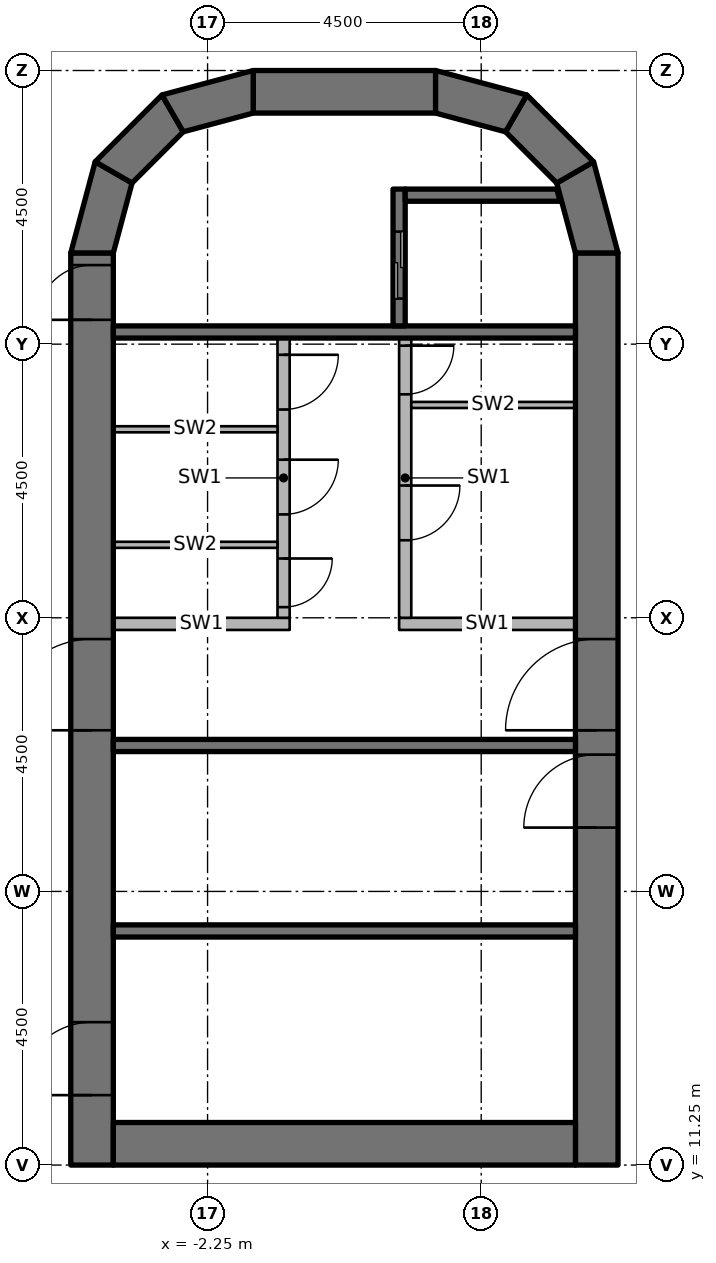
"""IFC4 building model, lengths in metres.
Left out: names, types, materials, properties, quantities, classifications, styles, units other than length and angle.
Written with IfcOpenShell. Run it as: python <this file> out.ifc"""

import sys

from ifc_helpers import new_model, si_unit, direction, frame, frame_2d, origin, place, context, subcontext, project, spatial, polyline, rectangle, outline, extrude, element, fill, save


model = new_model("IFC4")
c1 = context("Model", 3, precision=1e-05, world=origin(), true_north=direction((0.0, 1.0)))
c2 = subcontext(c1, "Body", "Model", "MODEL_VIEW")
j1 = project(units=[si_unit("LENGTHUNIT", "METRE"), si_unit("PLANEANGLEUNIT", "RADIAN")], contexts=[c1])
p1 = place(None, origin())
s1 = spatial("IfcSite", under=j1, at=p1, CompositionType="ELEMENT")
p2 = place(p1, origin())
s2 = spatial("IfcBuilding", under=s1, at=p2, CompositionType="ELEMENT")
p3 = place(p2, frame((0.0, 0.0, 190.4)))
s3 = spatial("IfcBuildingStorey", under=s2, at=p3, CompositionType="ELEMENT", Elevation=190.4)
p4 = place(p3, frame((-4.15, 11.25, 0.0), z_axis=(0.0, 0.0, 1.0), x_axis=(0.0, 1.0, 0.0)))
e1 = element("IfcWall", 1, at=p4, inside=s3, PredefinedType="SHEAR", context=c2, shape_type="SweptSolid", body=[
    extrude(rectangle(XDim=15.0, YDim=0.7, at=frame_2d((7.5, 0.0))), origin(), (0.0, 0.0, 1.0), 5.0),
])
p5 = place(p4, frame((7.15, 0.0, 0.0)))
e2 = element("IfcOpeningElement", 2, at=p5, cuts=e1, PredefinedType="OPENING", context=c2, shape_type="SweptSolid", body=[
    extrude(rectangle(XDim=1.5, YDim=2.3, at=frame_2d((0.75, 1.15))), frame((0.0, 0.36, 0.0), z_axis=(0.0, -1.0, 0.0), x_axis=(1.0, 0.0, 0.0)), (0.0, 0.0, 1.0), 0.72),
])
p6 = place(p4, frame((13.9, 0.0, 0.0)))
e3 = element("IfcOpeningElement", 3, at=p6, cuts=e1, PredefinedType="OPENING", context=c2, shape_type="SweptSolid", body=[
    extrude(rectangle(XDim=0.9, YDim=2.1, at=frame_2d((0.45, 1.05))), frame((0.0, 0.36, 0.0), z_axis=(0.0, -1.0, 0.0), x_axis=(1.0, 0.0, 0.0)), (0.0, 0.0, 1.0), 0.72),
])
p7 = place(p4, frame((1.15, 0.0, 0.0)))
e4 = element("IfcOpeningElement", 4, at=p7, cuts=e1, PredefinedType="OPENING", context=c2, shape_type="SweptSolid", body=[
    extrude(rectangle(XDim=1.2, YDim=2.1, at=frame_2d((0.6, 1.05))), frame((0.0, 0.36, 0.0), z_axis=(0.0, -1.0, 0.0), x_axis=(1.0, 0.0, 0.0)), (0.0, 0.0, 1.0), 0.72),
])
p8 = place(p3, frame((4.15, 11.25, 0.0), z_axis=(0.0, 0.0, 1.0), x_axis=(0.0, 1.0, 0.0)))
e5 = element("IfcWall", 5, at=p8, inside=s3, PredefinedType="SHEAR", context=c2, shape_type="SweptSolid", body=[
    extrude(rectangle(XDim=15.0, YDim=0.7, at=frame_2d((7.5, 0.0))), origin(), (0.0, 0.0, 1.0), 5.0),
])
p9 = place(p8, frame((7.15, 0.0, 0.0)))
e6 = element("IfcOpeningElement", 6, at=p9, cuts=e5, PredefinedType="OPENING", context=c2, shape_type="SweptSolid", body=[
    extrude(rectangle(XDim=1.5, YDim=2.3, at=frame_2d((0.75, 1.15))), frame((0.0, 0.36, 0.0), z_axis=(0.0, -1.0, 0.0), x_axis=(1.0, 0.0, 0.0)), (0.0, 0.0, 1.0), 0.72),
])
p10 = place(p8, frame((5.55, 0.0, 0.0)))
e7 = element("IfcOpeningElement", 7, at=p10, cuts=e5, PredefinedType="OPENING", context=c2, shape_type="SweptSolid", body=[
    extrude(rectangle(XDim=1.2, YDim=2.1, at=frame_2d((0.6, 1.05))), frame((0.0, 0.36, 0.0), z_axis=(0.0, -1.0, 0.0), x_axis=(1.0, 0.0, 0.0)), (0.0, 0.0, 1.0), 0.72),
])
p11 = place(p3, frame((-3.8, 11.6, 0.0), z_axis=(0.0, 0.0, 1.0), x_axis=(1.0, 0.0, 0.0)))
e8 = element("IfcWall", 8, at=p11, inside=s3, PredefinedType="SHEAR", context=c2, shape_type="SweptSolid", body=[
    extrude(rectangle(XDim=7.6, YDim=0.7, at=frame_2d((3.8, 0.0))), origin(), (0.0, 0.0, 1.0), 5.0),
])
p12 = place(p3, frame((-1.5, 28.9, 0.0), z_axis=(0.0, 0.0, 1.0), x_axis=(1.0, 0.0, 0.0)))
e9 = element("IfcWall", 9, at=p12, inside=s3, PredefinedType="SHEAR", context=c2, shape_type="SweptSolid", body=[
    extrude(rectangle(XDim=3.0, YDim=0.7, at=frame_2d((1.5, 0.0))), origin(), (0.0, 0.0, 1.0), 5.0),
])
p13 = place(p3, origin())
e10 = element("IfcWall", 10, at=p13, inside=s3, PredefinedType="SHEAR", context=c2, shape_type="SweptSolid", body=[
    extrude(outline(polyline([(-4.5, 26.25), (-4.098, 27.75), (-3.492, 27.4), (-3.8, 26.25), (-4.5, 26.25)])), origin(), (0.0, 0.0, 1.0), 5.0),
])
p14 = place(p3, origin())
e11 = element("IfcWall", 11, at=p14, inside=s3, PredefinedType="SHEAR", context=c2, shape_type="SweptSolid", body=[
    extrude(outline(polyline([(-4.098, 27.75), (-3.0, 28.848), (-2.65, 28.242), (-3.492, 27.4), (-4.098, 27.75)])), origin(), (0.0, 0.0, 1.0), 5.0),
])
p15 = place(p3, origin())
e12 = element("IfcWall", 12, at=p15, inside=s3, PredefinedType="SHEAR", context=c2, shape_type="SweptSolid", body=[
    extrude(outline(polyline([(-3.0, 28.848), (-1.5, 29.25), (-1.5, 28.55), (-2.65, 28.242), (-3.0, 28.848)])), origin(), (0.0, 0.0, 1.0), 5.0),
])
p16 = place(p3, origin())
e13 = element("IfcWall", 13, at=p16, inside=s3, PredefinedType="SHEAR", context=c2, shape_type="SweptSolid", body=[
    extrude(outline(polyline([(4.5, 26.25), (4.098, 27.75), (3.492, 27.4), (3.8, 26.25), (4.5, 26.25)])), origin(), (0.0, 0.0, 1.0), 5.0),
])
p17 = place(p3, origin())
e14 = element("IfcWall", 14, at=p17, inside=s3, PredefinedType="SHEAR", context=c2, shape_type="SweptSolid", body=[
    extrude(outline(polyline([(4.098, 27.75), (3.0, 28.848), (2.65, 28.242), (3.492, 27.4), (4.098, 27.75)])), origin(), (0.0, 0.0, 1.0), 5.0),
])
p18 = place(p3, origin())
e15 = element("IfcWall", 15, at=p18, inside=s3, PredefinedType="SHEAR", context=c2, shape_type="SweptSolid", body=[
    extrude(outline(polyline([(3.0, 28.848), (1.5, 29.25), (1.5, 28.55), (2.65, 28.242), (3.0, 28.848)])), origin(), (0.0, 0.0, 1.0), 5.0),
])
p19 = place(p3, origin())
e16 = element("IfcWall", 16, at=p19, inside=s3, PredefinedType="SOLIDWALL", context=c2, shape_type="SweptSolid", body=[
    extrude(outline(polyline([(6.129, 29.24), (4.49, 30.879), (4.386, 30.7), (5.95, 29.136), (6.129, 29.24)])), origin(), (0.0, 0.0, 1.0), 4.85),
])
p20 = place(p3, origin())
e17 = element("IfcWall", 17, at=p20, inside=s3, PredefinedType="SOLIDWALL", context=c2, shape_type="SweptSolid", body=[
    extrude(outline(polyline([(-4.49, 30.879), (-6.129, 29.24), (-5.95, 29.136), (-4.386, 30.7), (-4.49, 30.879)])), origin(), (0.0, 0.0, 1.0), 4.85),
])
p21 = place(p3, frame((-3.8, 24.95, 0.0), z_axis=(0.0, 0.0, 1.0), x_axis=(1.0, 0.0, 0.0)))
e18 = element("IfcWall", 18, at=p21, inside=s3, PredefinedType="SHEAR", context=c2, shape_type="SweptSolid", body=[
    extrude(rectangle(XDim=7.6, YDim=0.2, at=frame_2d((3.8, 0.0))), origin(), (0.0, 0.0, 1.0), 4.85),
])
p22 = place(p3, frame((0.9, 27.3, 0.0), z_axis=(0.0, 0.0, 1.0), x_axis=(0.0, -1.0, 0.0)))
e19 = element("IfcWall", 19, at=p22, inside=s3, PredefinedType="SHEAR", context=c2, shape_type="SweptSolid", body=[
    extrude(rectangle(XDim=2.25, YDim=0.2, at=frame_2d((1.125, 0.0))), origin(), (0.0, 0.0, 1.0), 4.85),
])
p23 = place(p22, frame((0.7, 0.0, 0.0)))
e20 = element("IfcOpeningElement", 20, at=p23, cuts=e19, PredefinedType="OPENING", context=c2, shape_type="SweptSolid", body=[
    extrude(rectangle(XDim=1.1, YDim=2.3, at=frame_2d((0.55, 1.15))), frame((0.0, 0.11, 0.0), z_axis=(0.0, -1.0, 0.0), x_axis=(1.0, 0.0, 0.0)), (0.0, 0.0, 1.0), 0.22),
])
p24 = place(p3, origin())
e21 = element("IfcWall", 21, at=p24, inside=s3, PredefinedType="SHEAR", context=c2, shape_type="SweptSolid", body=[
    extrude(outline(polyline([(1.0, 27.1), (3.548, 27.1), (3.494, 27.3), (1.0, 27.3), (1.0, 27.1)])), origin(), (0.0, 0.0, 1.0), 4.85),
])
for number, where, z_axis, x_axis in (
    (22, (-3.8, 18.15, 0.0), (0.0, 0.0, 1.0), (1.0, 0.0, 0.0)),
    (23, (-3.8, 15.1, 0.0), (0.0, 0.0, 1.0), (1.0, 0.0, 0.0)),
):
    element("IfcWall", number, at=place(p3, frame(where, z_axis=z_axis, x_axis=x_axis)), inside=s3, PredefinedType="SHEAR", context=c2, shape_type="SweptSolid", body=[
        extrude(rectangle(XDim=7.6, YDim=0.2, at=frame_2d((3.8, 0.0))), origin(), (0.0, 0.0, 1.0), 4.85),
    ])
p25 = place(p3, frame((-3.8, 20.15, 0.0), z_axis=(0.0, 0.0, 1.0), x_axis=(1.0, 0.0, 0.0)))
e24 = element("IfcWall", 24, at=p25, inside=s3, PredefinedType="PARTITIONING", context=c2, shape_type="SweptSolid", body=[
    extrude(rectangle(XDim=2.9, YDim=0.2, at=frame_2d((1.45, 0.0))), origin(), (0.0, 0.0, 1.0), 4.85),
])
p26 = place(p3, frame((-1.0, 24.85, 0.0), z_axis=(0.0, 0.0, 1.0), x_axis=(0.0, -1.0, 0.0)))
e25 = element("IfcWall", 25, at=p26, inside=s3, PredefinedType="PARTITIONING", context=c2, shape_type="SweptSolid", body=[
    extrude(rectangle(XDim=4.6, YDim=0.2, at=frame_2d((2.3, 0.0))), origin(), (0.0, 0.0, 1.0), 4.85),
])
p27 = place(p26, frame((0.275, 0.0, 0.0)))
e26 = element("IfcOpeningElement", 26, at=p27, cuts=e25, PredefinedType="OPENING", context=c2, shape_type="SweptSolid", body=[
    extrude(rectangle(XDim=0.9, YDim=2.1, at=frame_2d((0.45, 1.05))), frame((0.0, 0.11, 0.0), z_axis=(0.0, -1.0, 0.0), x_axis=(1.0, 0.0, 0.0)), (0.0, 0.0, 1.0), 0.22),
])
p28 = place(p26, frame((2.0, 0.0, 0.0)))
e27 = element("IfcOpeningElement", 27, at=p28, cuts=e25, PredefinedType="OPENING", context=c2, shape_type="SweptSolid", body=[
    extrude(rectangle(XDim=0.9, YDim=2.1, at=frame_2d((0.45, 1.05))), frame((0.0, 0.11, 0.0), z_axis=(0.0, -1.0, 0.0), x_axis=(1.0, 0.0, 0.0)), (0.0, 0.0, 1.0), 0.22),
])
p29 = place(p26, frame((3.625, 0.0, 0.0)))
e28 = element("IfcOpeningElement", 28, at=p29, cuts=e25, PredefinedType="OPENING", context=c2, shape_type="SweptSolid", body=[
    extrude(rectangle(XDim=0.8, YDim=2.1, at=frame_2d((0.4, 1.05))), frame((0.0, 0.11, 0.0), z_axis=(0.0, -1.0, 0.0), x_axis=(1.0, 0.0, 0.0)), (0.0, 0.0, 1.0), 0.22),
])
p30 = place(p3, frame((0.9, 20.15, 0.0), z_axis=(0.0, 0.0, 1.0), x_axis=(1.0, 0.0, 0.0)))
e29 = element("IfcWall", 29, at=p30, inside=s3, PredefinedType="PARTITIONING", context=c2, shape_type="SweptSolid", body=[
    extrude(rectangle(XDim=2.9, YDim=0.2, at=frame_2d((1.45, 0.0))), origin(), (0.0, 0.0, 1.0), 4.85),
])
p31 = place(p3, frame((1.0, 24.85, 0.0), z_axis=(0.0, 0.0, 1.0), x_axis=(0.0, -1.0, 0.0)))
e30 = element("IfcWall", 30, at=p31, inside=s3, PredefinedType="PARTITIONING", context=c2, shape_type="SweptSolid", body=[
    extrude(rectangle(XDim=4.6, YDim=0.2, at=frame_2d((2.3, 0.0))), origin(), (0.0, 0.0, 1.0), 4.85),
])
p32 = place(p31, frame((0.125, 0.0, 0.0)))
e31 = element("IfcOpeningElement", 31, at=p32, cuts=e30, PredefinedType="OPENING", context=c2, shape_type="SweptSolid", body=[
    extrude(rectangle(XDim=0.8, YDim=2.1, at=frame_2d((0.4, 1.05))), frame((0.0, 0.11, 0.0), z_axis=(0.0, -1.0, 0.0), x_axis=(1.0, 0.0, 0.0)), (0.0, 0.0, 1.0), 0.22),
])
p33 = place(p31, frame((2.425, 0.0, 0.0)))
e32 = element("IfcOpeningElement", 32, at=p33, cuts=e30, PredefinedType="OPENING", context=c2, shape_type="SweptSolid", body=[
    extrude(rectangle(XDim=0.9, YDim=2.1, at=frame_2d((0.45, 1.05))), frame((0.0, 0.11, 0.0), z_axis=(0.0, -1.0, 0.0), x_axis=(1.0, 0.0, 0.0)), (0.0, 0.0, 1.0), 0.22),
])
for number, where, z_axis, x_axis in (
    (33, (-3.8, 23.35, 0.0), (0.0, 0.0, 1.0), (1.0, 0.0, 0.0)),
    (34, (-3.8, 21.45, 0.0), (0.0, 0.0, 1.0), (1.0, 0.0, 0.0)),
    (35, (1.1, 23.75, 0.0), (0.0, 0.0, 1.0), (1.0, 0.0, 0.0)),
):
    element("IfcWall", number, at=place(p3, frame(where, z_axis=z_axis, x_axis=x_axis)), inside=s3, PredefinedType="PARTITIONING", context=c2, shape_type="SweptSolid", body=[
        extrude(rectangle(XDim=2.7, YDim=0.1, at=frame_2d((1.35, 0.0))), origin(), (0.0, 0.0, 1.0), 4.85),
    ])
p34 = place(p5, origin())
e36 = element("IfcDoor", 36, at=p34, inside=s3, OperationType="DOUBLE_DOOR_SINGLE_SWING", PredefinedType="DOOR", context=c2, shape_type="SweptSolid", body=[
    extrude(rectangle(XDim=1.5, YDim=2.3, at=frame_2d((0.75, 1.15))), frame((0.0, 0.025, 0.0), z_axis=(0.0, -1.0, 0.0), x_axis=(1.0, 0.0, 0.0)), (0.0, 0.0, 1.0), 0.05),
])
fill(e2, e36)
p35 = place(p9, origin())
e37 = element("IfcDoor", 37, at=p35, inside=s3, OperationType="DOUBLE_DOOR_SINGLE_SWING", PredefinedType="DOOR", context=c2, shape_type="SweptSolid", body=[
    extrude(rectangle(XDim=1.5, YDim=2.3, at=frame_2d((0.75, 1.15))), frame((0.0, 0.025, 0.0), z_axis=(0.0, -1.0, 0.0), x_axis=(1.0, 0.0, 0.0)), (0.0, 0.0, 1.0), 0.05),
])
fill(e6, e37)
p36 = place(p6, origin())
e38 = element("IfcDoor", 38, at=p36, inside=s3, OperationType="SINGLE_SWING_LEFT", PredefinedType="DOOR", context=c2, shape_type="SweptSolid", body=[
    extrude(rectangle(XDim=0.9, YDim=2.1, at=frame_2d((0.45, 1.05))), frame((0.0, 0.025, 0.0), z_axis=(0.0, -1.0, 0.0), x_axis=(1.0, 0.0, 0.0)), (0.0, 0.0, 1.0), 0.05),
])
fill(e3, e38)
p37 = place(p10, origin())
e39 = element("IfcDoor", 39, at=p37, inside=s3, OperationType="SINGLE_SWING_RIGHT", PredefinedType="DOOR", context=c2, shape_type="SweptSolid", body=[
    extrude(rectangle(XDim=1.2, YDim=2.1, at=frame_2d((0.6, 1.05))), frame((0.0, 0.025, 0.0), z_axis=(0.0, -1.0, 0.0), x_axis=(1.0, 0.0, 0.0)), (0.0, 0.0, 1.0), 0.05),
])
fill(e7, e39)
p38 = place(p7, origin())
e40 = element("IfcDoor", 40, at=p38, inside=s3, OperationType="SINGLE_SWING_RIGHT", PredefinedType="DOOR", context=c2, shape_type="SweptSolid", body=[
    extrude(rectangle(XDim=1.2, YDim=2.1, at=frame_2d((0.6, 1.05))), frame((0.0, 0.025, 0.0), z_axis=(0.0, -1.0, 0.0), x_axis=(1.0, 0.0, 0.0)), (0.0, 0.0, 1.0), 0.05),
])
fill(e4, e40)
p39 = place(p23, origin())
e41 = element("IfcDoor", 41, at=p39, inside=s3, OperationType="DOUBLE_DOOR_SLIDING", PredefinedType="DOOR", context=c2, shape_type="SweptSolid", body=[
    extrude(rectangle(XDim=1.1, YDim=2.3, at=frame_2d((0.55, 1.15))), frame((0.0, 0.025, 0.0), z_axis=(0.0, -1.0, 0.0), x_axis=(1.0, 0.0, 0.0)), (0.0, 0.0, 1.0), 0.05),
])
fill(e20, e41)
p40 = place(p27, origin())
e42 = element("IfcDoor", 42, at=p40, inside=s3, OperationType="SINGLE_SWING_LEFT", PredefinedType="DOOR", context=c2, shape_type="SweptSolid", body=[
    extrude(rectangle(XDim=0.9, YDim=2.1, at=frame_2d((0.45, 1.05))), frame((0.0, 0.025, 0.0), z_axis=(0.0, -1.0, 0.0), x_axis=(1.0, 0.0, 0.0)), (0.0, 0.0, 1.0), 0.05),
])
fill(e26, e42)
p41 = place(p28, origin())
e43 = element("IfcDoor", 43, at=p41, inside=s3, OperationType="SINGLE_SWING_LEFT", PredefinedType="DOOR", context=c2, shape_type="SweptSolid", body=[
    extrude(rectangle(XDim=0.9, YDim=2.1, at=frame_2d((0.45, 1.05))), frame((0.0, 0.025, 0.0), z_axis=(0.0, -1.0, 0.0), x_axis=(1.0, 0.0, 0.0)), (0.0, 0.0, 1.0), 0.05),
])
fill(e27, e43)
p42 = place(p29, origin())
e44 = element("IfcDoor", 44, at=p42, inside=s3, OperationType="SINGLE_SWING_LEFT", PredefinedType="DOOR", context=c2, shape_type="SweptSolid", body=[
    extrude(rectangle(XDim=0.8, YDim=2.1, at=frame_2d((0.4, 1.05))), frame((0.0, 0.025, 0.0), z_axis=(0.0, -1.0, 0.0), x_axis=(1.0, 0.0, 0.0)), (0.0, 0.0, 1.0), 0.05),
])
fill(e28, e44)
p43 = place(p32, origin())
e45 = element("IfcDoor", 45, at=p43, inside=s3, OperationType="SINGLE_SWING_LEFT", PredefinedType="DOOR", context=c2, shape_type="SweptSolid", body=[
    extrude(rectangle(XDim=0.8, YDim=2.1, at=frame_2d((0.4, 1.05))), frame((0.0, 0.025, 0.0), z_axis=(0.0, -1.0, 0.0), x_axis=(1.0, 0.0, 0.0)), (0.0, 0.0, 1.0), 0.05),
])
fill(e31, e45)
p44 = place(p33, origin())
e46 = element("IfcDoor", 46, at=p44, inside=s3, OperationType="SINGLE_SWING_RIGHT", PredefinedType="DOOR", context=c2, shape_type="SweptSolid", body=[
    extrude(rectangle(XDim=0.9, YDim=2.1, at=frame_2d((0.45, 1.05))), frame((0.0, 0.025, 0.0), z_axis=(0.0, -1.0, 0.0), x_axis=(1.0, 0.0, 0.0)), (0.0, 0.0, 1.0), 0.05),
])
fill(e32, e46)
save(model, sys.argv[1])
